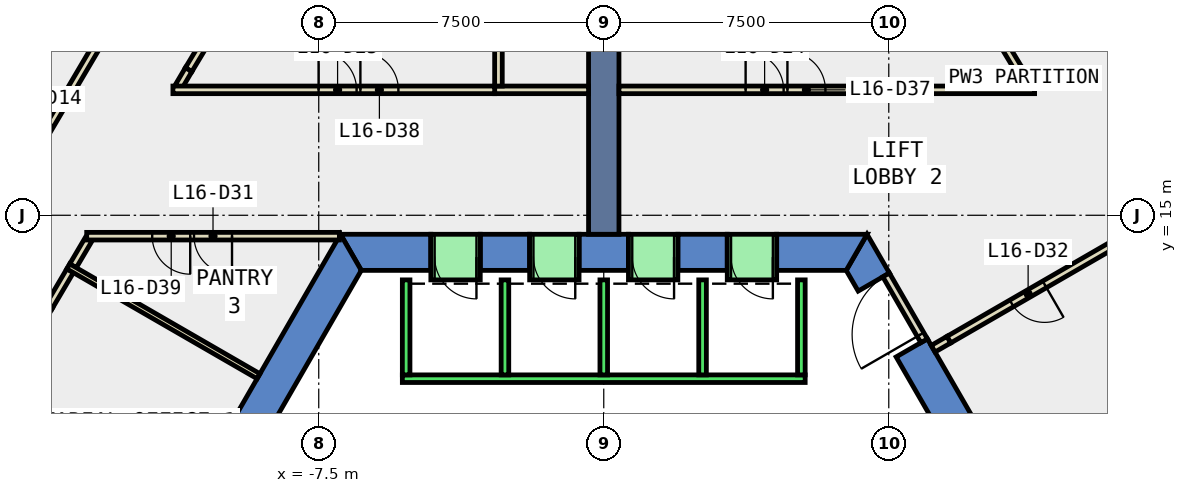
"""IFC4 building model, lengths in metres.
Left out: names, types, materials, properties, quantities, classifications, styles, units other than length and angle.
Written with IfcOpenShell. Run it as: python <this file> out.ifc"""

import sys

from ifc_helpers import new_model, si_unit, direction, frame, frame_2d, origin, place, context, subcontext, project, spatial, polyline, rectangle, outline, extrude, element, fill, save


model = new_model("IFC4")
c1 = context("Model", 3, precision=1e-05, world=origin(), true_north=direction((0.0, 1.0)))
c2 = subcontext(c1, "Body", "Model", "MODEL_VIEW")
j1 = project(units=[si_unit("LENGTHUNIT", "METRE"), si_unit("PLANEANGLEUNIT", "RADIAN")], contexts=[c1])
p1 = place(None, origin())
s1 = spatial("IfcSite", under=j1, at=p1, CompositionType="ELEMENT")
p2 = place(p1, origin())
s2 = spatial("IfcBuilding", under=s1, at=p2, CompositionType="ELEMENT")
p3 = place(p2, frame((0.0, 0.0, 77.0)))
s3 = spatial("IfcBuildingStorey", under=s2, at=p3, CompositionType="ELEMENT", Elevation=77.0)
p4 = place(p3, frame((0.0, 0.0, -0.4)))
e1 = element("IfcWall", 1, at=p4, inside=s3, PredefinedType="SHEAR", context=c2, shape_type="SweptSolid", body=[
    extrude(outline(polyline([(8.517, 11.748), (7.694, 11.273), (12.759, 2.5), (13.856, 2.5), (8.517, 11.748)])), origin(), (0.0, 0.0, 1.0), 4.0),
])
p5 = place(p3, frame((0.0, 0.0, -0.4)))
e2 = element("IfcWall", 2, at=p5, inside=s3, PredefinedType="SHEAR", context=c2, shape_type="SweptSolid", body=[
    extrude(outline(polyline([(6.695, 13.005), (7.517, 13.48), (6.928, 14.5), (6.38, 13.55), (6.695, 13.005)])), origin(), (0.0, 0.0, 1.0), 4.0),
])
p6 = place(p3, frame((0.0, 0.0, -0.4)))
e3 = element("IfcWall", 3, at=p6, inside=s3, PredefinedType="SHEAR", context=c2, shape_type="SweptSolid", body=[
    extrude(outline(polyline([(4.55, 14.5), (4.55, 13.55), (6.38, 13.55), (6.928, 14.5), (4.55, 14.5)])), origin(), (0.0, 0.0, 1.0), 4.0),
])
p7 = place(p3, frame((0.0, 0.0, -0.4)))
e4 = element("IfcWall", 4, at=p7, inside=s3, PredefinedType="SHEAR", context=c2, shape_type="SweptSolid", body=[
    extrude(outline(polyline([(1.95, 14.5), (1.95, 13.55), (3.25, 13.55), (3.25, 14.5), (1.95, 14.5)])), origin(), (0.0, 0.0, 1.0), 4.0),
])
p8 = place(p3, frame((0.0, 0.0, -0.4)))
e5 = element("IfcWall", 5, at=p8, inside=s3, PredefinedType="SHEAR", context=c2, shape_type="SweptSolid", body=[
    extrude(outline(polyline([(-0.65, 14.5), (-0.65, 13.55), (0.65, 13.55), (0.65, 14.5), (-0.65, 14.5)])), origin(), (0.0, 0.0, 1.0), 4.0),
])
p9 = place(p3, frame((0.0, 0.0, -0.4)))
e6 = element("IfcWall", 6, at=p9, inside=s3, PredefinedType="SHEAR", context=c2, shape_type="SweptSolid", body=[
    extrude(outline(polyline([(-3.25, 14.5), (-3.25, 13.55), (-1.95, 13.55), (-1.95, 14.5), (-3.25, 14.5)])), origin(), (0.0, 0.0, 1.0), 4.0),
])
p10 = place(p3, frame((0.0, 0.0, -0.4)))
e7 = element("IfcWall", 7, at=p10, inside=s3, PredefinedType="SHEAR", context=c2, shape_type="SweptSolid", body=[
    extrude(outline(polyline([(-4.55, 13.55), (-4.55, 14.5), (-6.928, 14.5), (-6.38, 13.55), (-4.55, 13.55)])), origin(), (0.0, 0.0, 1.0), 4.0),
])
p11 = place(p3, frame((0.0, 0.0, -0.4)))
e8 = element("IfcWall", 8, at=p11, inside=s3, PredefinedType="SHEAR", context=c2, shape_type="SweptSolid", body=[
    extrude(outline(polyline([(-12.267, 5.252), (-11.444, 4.777), (-6.38, 13.55), (-6.928, 14.5), (-12.267, 5.252)])), origin(), (0.0, 0.0, 1.0), 4.0),
])
p12 = place(p3, frame((0.0, 14.5, -0.4), z_axis=(0.0, 0.0, 1.0), x_axis=(0.0, 1.0, 0.0)))
e9 = element("IfcWall", 9, at=p12, inside=s3, PredefinedType="SHEAR", context=c2, shape_type="SweptSolid", body=[
    extrude(rectangle(XDim=9.0, YDim=0.8, at=frame_2d((4.5, 0.0))), origin(), (0.0, 0.0, 1.0), 4.0),
])
p13 = place(p3, frame((-14.042, 13.541, 0.0), z_axis=(0.0, 0.0, 1.0), x_axis=(-0.507733830316, -0.861513991501, 0.0)))
e10 = element("IfcWall", 10, at=p13, inside=s3, PredefinedType="PARTITIONING", context=c2, shape_type="SweptSolid", body=[
    extrude(rectangle(XDim=1.091, YDim=0.2, at=frame_2d((0.545, 0.0))), origin(), (0.0, 0.0, 1.0), 3.6),
])
p14 = place(p3, frame((-13.557, 14.364, 0.0), z_axis=(0.0, 0.0, 1.0), x_axis=(-0.507840899418, -0.861450881292, 0.0)))
e11 = element("IfcWall", 11, at=p14, inside=s3, PredefinedType="PARTITIONING", context=c2, shape_type="SweptSolid", body=[
    extrude(rectangle(XDim=0.806, YDim=0.2, at=frame_2d((0.403, 0.0))), origin(), (0.0, 0.0, 1.0), 3.6),
])
p15 = place(p3, frame((13.667, 14.375, 0.0), z_axis=(0.0, 0.0, 1.0), x_axis=(-0.866016748302, -0.500014991436, 0.0)))
e12 = element("IfcWall", 12, at=p15, inside=s3, PredefinedType="PARTITIONING", context=c2, shape_type="SweptSolid", body=[
    extrude(rectangle(XDim=5.298, YDim=0.2, at=frame_2d((2.649, 0.0))), origin(), (0.0, 0.0, 1.0), 3.6),
])
p16 = place(p15, frame((2.387, 0.0, 0.0)))
e13 = element("IfcOpeningElement", 13, at=p16, cuts=e12, PredefinedType="OPENING", context=c2, shape_type="SweptSolid", body=[
    extrude(rectangle(XDim=1.0, YDim=2.1, at=frame_2d((0.5, 1.05))), frame((0.0, 0.11, 0.0), z_axis=(0.0, -1.0, 0.0), x_axis=(1.0, 0.0, 0.0)), (0.0, 0.0, 1.0), 0.22),
])
p17 = place(p3, frame((11.186, 18.386, 0.0), z_axis=(0.0, 0.0, 1.0), x_axis=(-0.507247363226, 0.861800506208, 0.0)))
e14 = element("IfcWall", 14, at=p17, inside=s3, PredefinedType="PARTITIONING", context=c2, shape_type="SweptSolid", body=[
    extrude(rectangle(XDim=0.516, YDim=0.2, at=frame_2d((0.258, 0.0))), origin(), (0.0, 0.0, 1.0), 3.6),
])
p18 = place(p3, frame((10.924, 18.831, 0.0), z_axis=(0.0, 0.0, 1.0), x_axis=(-0.515797941416, 0.856710268195, 0.0)))
e15 = element("IfcWall", 15, at=p18, inside=s3, PredefinedType="PARTITIONING", context=c2, shape_type="SweptSolid", body=[
    extrude(rectangle(XDim=6.283, YDim=0.2, at=frame_2d((3.142, 0.0))), origin(), (0.0, 0.0, 1.0), 3.6),
])
p19 = place(p3, frame((-7.58, 24.386, 0.0), z_axis=(0.0, 0.0, 1.0), x_axis=(-0.51574664882, -0.85674114774, 0.0)))
e16 = element("IfcWall", 16, at=p19, inside=s3, PredefinedType="PARTITIONING", context=c2, shape_type="SweptSolid", body=[
    extrude(rectangle(XDim=6.484, YDim=0.2, at=frame_2d((3.242, 0.0))), origin(), (0.0, 0.0, 1.0), 3.6),
])
p20 = place(p3, frame((-10.924, 18.831, 0.0), z_axis=(0.0, 0.0, 1.0), x_axis=(-0.507247363226, -0.861800506208, 0.0)))
e17 = element("IfcWall", 17, at=p20, inside=s3, PredefinedType="PARTITIONING", context=c2, shape_type="SweptSolid", body=[
    extrude(rectangle(XDim=0.516, YDim=0.2, at=frame_2d((0.258, 0.0))), origin(), (0.0, 0.0, 1.0), 3.6),
])
p21 = place(p3, frame((12.986, 20.059, 0.0), z_axis=(0.0, 0.0, 1.0), x_axis=(0.507876424268, -0.861429937762, 0.0)))
e18 = element("IfcWall", 18, at=p21, inside=s3, PredefinedType="PARTITIONING", context=c2, shape_type="SweptSolid", body=[
    extrude(rectangle(XDim=3.55, YDim=0.2, at=frame_2d((1.775, 0.0))), origin(), (0.0, 0.0, 1.0), 3.6),
])
p22 = place(p21, frame((1.275, 0.0, 0.0)))
e19 = element("IfcOpeningElement", 19, at=p22, cuts=e18, PredefinedType="OPENING", context=c2, shape_type="SweptSolid", body=[
    extrude(rectangle(XDim=1.0, YDim=2.1, at=frame_2d((0.5, 1.05))), frame((0.0, 0.11, 0.0), z_axis=(0.0, -1.0, 0.0), x_axis=(1.0, 0.0, 0.0)), (0.0, 0.0, 1.0), 0.22),
])
p23 = place(p3, frame((-16.669, 13.811, 0.0), z_axis=(0.0, 0.0, 1.0), x_axis=(0.507777955495, 0.861487984776, 0.0)))
e20 = element("IfcWall", 20, at=p23, inside=s3, PredefinedType="PARTITIONING", context=c2, shape_type="SweptSolid", body=[
    extrude(rectangle(XDim=7.178, YDim=0.2, at=frame_2d((3.589, 0.0))), origin(), (0.0, 0.0, 1.0), 3.6),
])
p24 = place(p23, frame((3.164, 0.0, 0.0)))
e21 = element("IfcOpeningElement", 21, at=p24, cuts=e20, PredefinedType="OPENING", context=c2, shape_type="SweptSolid", body=[
    extrude(rectangle(XDim=1.0, YDim=2.1, at=frame_2d((0.5, 1.05))), frame((0.0, 0.11, 0.0), z_axis=(0.0, -1.0, 0.0), x_axis=(1.0, 0.0, 0.0)), (0.0, 0.0, 1.0), 0.22),
])
p25 = place(p3, frame((-14.091, 13.655, 0.0), z_axis=(0.0, 0.0, 1.0), x_axis=(0.866035778077, -0.499982030767, 0.0)))
e22 = element("IfcWall", 22, at=p25, inside=s3, PredefinedType="PARTITIONING", context=c2, shape_type="SweptSolid", body=[
    extrude(rectangle(XDim=5.781, YDim=0.15, at=frame_2d((2.89, 0.0))), origin(), (0.0, 0.0, 1.0), 3.6),
])
p26 = place(p3, frame((-6.957, 14.45, 0.0), z_axis=(0.0, 0.0, 1.0), x_axis=(-1.0, 0.0, 0.0)))
e23 = element("IfcWall", 23, at=p26, inside=s3, PredefinedType="PARTITIONING", context=c2, shape_type="SweptSolid", body=[
    extrude(rectangle(XDim=6.649, YDim=0.2, at=frame_2d((3.324, 0.0))), origin(), (0.0, 0.0, 1.0), 3.6),
])
p27 = place(p26, frame((2.825, 0.0, 0.0)))
e24 = element("IfcOpeningElement", 24, at=p27, cuts=e23, PredefinedType="OPENING", context=c2, shape_type="SweptSolid", body=[
    extrude(rectangle(XDim=1.0, YDim=2.1, at=frame_2d((0.5, 1.05))), frame((0.0, 0.11, 0.0), z_axis=(0.0, -1.0, 0.0), x_axis=(1.0, 0.0, 0.0)), (0.0, 0.0, 1.0), 0.22),
])
p28 = place(p26, frame((3.925, 0.0, 0.0)))
e25 = element("IfcOpeningElement", 25, at=p28, cuts=e23, PredefinedType="OPENING", context=c2, shape_type="SweptSolid", body=[
    extrude(rectangle(XDim=1.0, YDim=2.1, at=frame_2d((0.5, 1.05))), frame((0.0, 0.11, 0.0), z_axis=(0.0, -1.0, 0.0), x_axis=(1.0, 0.0, 0.0)), (0.0, 0.0, 1.0), 0.22),
])
p29 = place(p3, frame((-2.871, 18.3, 0.0), z_axis=(0.0, 0.0, 1.0), x_axis=(1.0, 0.0, 0.0)))
e26 = element("IfcWall", 26, at=p29, inside=s3, PredefinedType="PARTITIONING", context=c2, shape_type="SweptSolid", body=[
    extrude(rectangle(XDim=2.471, YDim=0.2, at=frame_2d((1.236, 0.0))), origin(), (0.0, 0.0, 1.0), 3.6),
])
p30 = place(p3, frame((-11.337, 18.3, 0.0), z_axis=(0.0, 0.0, 1.0), x_axis=(1.0, 0.0, 0.0)))
e27 = element("IfcWall", 27, at=p30, inside=s3, PredefinedType="PARTITIONING", context=c2, shape_type="SweptSolid", body=[
    extrude(rectangle(XDim=8.466, YDim=0.2, at=frame_2d((4.233, 0.0))), origin(), (0.0, 0.0, 1.0), 3.6),
])
p31 = place(p30, frame((3.833, 0.0, 0.0)))
e28 = element("IfcOpeningElement", 28, at=p31, cuts=e27, PredefinedType="OPENING", context=c2, shape_type="SweptSolid", body=[
    extrude(rectangle(XDim=1.0, YDim=2.1, at=frame_2d((0.5, 1.05))), frame((0.0, 0.11, 0.0), z_axis=(0.0, -1.0, 0.0), x_axis=(1.0, 0.0, 0.0)), (0.0, 0.0, 1.0), 0.22),
])
p32 = place(p30, frame((4.933, 0.0, 0.0)))
e29 = element("IfcOpeningElement", 29, at=p32, cuts=e27, PredefinedType="OPENING", context=c2, shape_type="SweptSolid", body=[
    extrude(rectangle(XDim=1.0, YDim=2.1, at=frame_2d((0.5, 1.05))), frame((0.0, 0.11, 0.0), z_axis=(0.0, -1.0, 0.0), x_axis=(1.0, 0.0, 0.0)), (0.0, 0.0, 1.0), 0.22),
])
p33 = place(p3, frame((-2.771, 18.4, 0.0), z_axis=(0.0, 0.0, 1.0), x_axis=(0.0, 1.0, 0.0)))
e30 = element("IfcWall", 30, at=p33, inside=s3, PredefinedType="PARTITIONING", context=c2, shape_type="SweptSolid", body=[
    extrude(rectangle(XDim=6.0, YDim=0.2, at=frame_2d((3.0, 0.0))), origin(), (0.0, 0.0, 1.0), 3.6),
])
p34 = place(p3, frame((8.43, 11.698, 0.0), z_axis=(0.0, 0.0, 1.0), x_axis=(-0.50002537861, 0.866010750942, 0.0)))
e31 = element("IfcWall", 31, at=p34, inside=s3, PredefinedType="PARTITIONING", context=c2, shape_type="SweptSolid", body=[
    extrude(rectangle(XDim=2.0, YDim=0.2, at=frame_2d((1.0, 0.0))), origin(), (0.0, 0.0, 1.0), 2.4),
])
p35 = place(p34, frame((0.19, 0.0, 0.0)))
e32 = element("IfcOpeningElement", 32, at=p35, cuts=e31, PredefinedType="OPENING", context=c2, shape_type="SweptSolid", body=[
    extrude(rectangle(XDim=1.8, YDim=2.1, at=frame_2d((0.9, 1.05))), frame((0.0, 0.11, 0.0), z_axis=(0.0, -1.0, 0.0), x_axis=(1.0, 0.0, 0.0)), (0.0, 0.0, 1.0), 0.22),
])
p36 = place(p3, frame((0.4, 18.3, 0.0), z_axis=(0.0, 0.0, 1.0), x_axis=(1.0, 0.0, 0.0)))
e33 = element("IfcWall", 33, at=p36, inside=s3, PredefinedType="PARTITIONING", context=c2, shape_type="SweptSolid", body=[
    extrude(rectangle(XDim=10.937, YDim=0.2, at=frame_2d((5.469, 0.0))), origin(), (0.0, 0.0, 1.0), 3.6),
])
p37 = place(p36, frame((3.333, 0.0, 0.0)))
e34 = element("IfcOpeningElement", 34, at=p37, cuts=e33, PredefinedType="OPENING", context=c2, shape_type="SweptSolid", body=[
    extrude(rectangle(XDim=1.0, YDim=2.1, at=frame_2d((0.5, 1.05))), frame((0.0, 0.11, 0.0), z_axis=(0.0, -1.0, 0.0), x_axis=(1.0, 0.0, 0.0)), (0.0, 0.0, 1.0), 0.22),
])
p38 = place(p36, frame((4.433, 0.0, 0.0)))
e35 = element("IfcOpeningElement", 35, at=p38, cuts=e33, PredefinedType="OPENING", context=c2, shape_type="SweptSolid", body=[
    extrude(rectangle(XDim=1.0, YDim=2.1, at=frame_2d((0.5, 1.05))), frame((0.0, 0.11, 0.0), z_axis=(0.0, -1.0, 0.0), x_axis=(1.0, 0.0, 0.0)), (0.0, 0.0, 1.0), 0.22),
])
p39 = place(p3, frame((9.079, 11.726, 0.0), z_axis=(0.0, 0.0, 1.0), x_axis=(-0.865929261247, -0.500166486798, 0.0)))
e36 = element("IfcWall", 36, at=p39, inside=s3, PredefinedType="PARTITIONING", context=c2, shape_type="SweptSolid", body=[
    extrude(rectangle(XDim=0.476, YDim=0.2, at=frame_2d((0.238, 0.0))), origin(), (0.0, 0.0, 1.0), 2.4),
])
p40 = place(p3, frame((5.3, 10.7, 0.0), z_axis=(0.0, 0.0, 1.0), x_axis=(-1.0, 0.0, 0.0)))
e37 = element("IfcWall", 37, at=p40, inside=s3, PredefinedType="STANDARD", context=c2, shape_type="SweptSolid", body=[
    extrude(rectangle(XDim=10.6, YDim=0.2, at=frame_2d((5.3, 0.0))), origin(), (0.0, 0.0, 1.0), 3.6),
])
for number, where, z_axis, x_axis in (
    (38, (5.2, 10.8, 0.0), (0.0, 0.0, 1.0), (0.0, 1.0, 0.0)),
    (39, (2.6, 10.8, 0.0), (0.0, 0.0, 1.0), (0.0, 1.0, 0.0)),
    (40, (0.0, 10.8, 0.0), (0.0, 0.0, 1.0), (0.0, 1.0, 0.0)),
    (41, (-2.6, 10.8, 0.0), (0.0, 0.0, 1.0), (0.0, 1.0, 0.0)),
    (42, (-5.2, 10.8, 0.0), (0.0, 0.0, 1.0), (0.0, 1.0, 0.0)),
):
    element("IfcWall", number, at=place(p3, frame(where, z_axis=z_axis, x_axis=x_axis)), inside=s3, PredefinedType="STANDARD", context=c2, shape_type="SweptSolid", body=[
        extrude(rectangle(XDim=2.5, YDim=0.2, at=frame_2d((1.25, 0.0))), origin(), (0.0, 0.0, 1.0), 3.6),
    ])
p41 = place(p3, frame((4.55, 13.9, 0.0), z_axis=(0.0, 0.0, 1.0), x_axis=(-1.0, 0.0, 0.0)))
e43 = element("IfcWall", 43, at=p41, inside=s3, PredefinedType="STANDARD", context=c2, shape_type="SweptSolid", body=[
    extrude(rectangle(XDim=1.3, YDim=1.2, at=frame_2d((0.65, 0.0))), origin(), (0.0, 0.0, 1.0), 2.4),
])
p42 = place(p41, frame((0.1, 0.0, 0.0)))
e44 = element("IfcOpeningElement", 44, at=p42, cuts=e43, PredefinedType="OPENING", context=c2, shape_type="SweptSolid", body=[
    extrude(rectangle(XDim=1.1, YDim=2.3, at=frame_2d((0.55, 1.15))), frame((0.0, 0.61, 0.0), z_axis=(0.0, -1.0, 0.0), x_axis=(1.0, 0.0, 0.0)), (0.0, 0.0, 1.0), 1.22),
])
p43 = place(p3, frame((1.95, 13.9, 0.0), z_axis=(0.0, 0.0, 1.0), x_axis=(-1.0, 0.0, 0.0)))
e45 = element("IfcWall", 45, at=p43, inside=s3, PredefinedType="STANDARD", context=c2, shape_type="SweptSolid", body=[
    extrude(rectangle(XDim=1.3, YDim=1.2, at=frame_2d((0.65, 0.0))), origin(), (0.0, 0.0, 1.0), 2.4),
])
p44 = place(p43, frame((0.1, 0.0, 0.0)))
e46 = element("IfcOpeningElement", 46, at=p44, cuts=e45, PredefinedType="OPENING", context=c2, shape_type="SweptSolid", body=[
    extrude(rectangle(XDim=1.1, YDim=2.3, at=frame_2d((0.55, 1.15))), frame((0.0, 0.61, 0.0), z_axis=(0.0, -1.0, 0.0), x_axis=(1.0, 0.0, 0.0)), (0.0, 0.0, 1.0), 1.22),
])
p45 = place(p3, frame((-0.65, 13.9, 0.0), z_axis=(0.0, 0.0, 1.0), x_axis=(-1.0, 0.0, 0.0)))
e47 = element("IfcWall", 47, at=p45, inside=s3, PredefinedType="STANDARD", context=c2, shape_type="SweptSolid", body=[
    extrude(rectangle(XDim=1.3, YDim=1.2, at=frame_2d((0.65, 0.0))), origin(), (0.0, 0.0, 1.0), 2.4),
])
p46 = place(p45, frame((0.1, 0.0, 0.0)))
e48 = element("IfcOpeningElement", 48, at=p46, cuts=e47, PredefinedType="OPENING", context=c2, shape_type="SweptSolid", body=[
    extrude(rectangle(XDim=1.1, YDim=2.3, at=frame_2d((0.55, 1.15))), frame((0.0, 0.61, 0.0), z_axis=(0.0, -1.0, 0.0), x_axis=(1.0, 0.0, 0.0)), (0.0, 0.0, 1.0), 1.22),
])
p47 = place(p3, frame((-3.25, 13.9, 0.0), z_axis=(0.0, 0.0, 1.0), x_axis=(-1.0, 0.0, 0.0)))
e49 = element("IfcWall", 49, at=p47, inside=s3, PredefinedType="STANDARD", context=c2, shape_type="SweptSolid", body=[
    extrude(rectangle(XDim=1.3, YDim=1.2, at=frame_2d((0.65, 0.0))), origin(), (0.0, 0.0, 1.0), 2.4),
])
p48 = place(p47, frame((0.1, 0.0, 0.0)))
e50 = element("IfcOpeningElement", 50, at=p48, cuts=e49, PredefinedType="OPENING", context=c2, shape_type="SweptSolid", body=[
    extrude(rectangle(XDim=1.1, YDim=2.3, at=frame_2d((0.55, 1.15))), frame((0.0, 0.61, 0.0), z_axis=(0.0, -1.0, 0.0), x_axis=(1.0, 0.0, 0.0)), (0.0, 0.0, 1.0), 1.22),
])
p49 = place(p37, origin())
e51 = element("IfcDoor", 51, at=p49, inside=s3, OperationType="SINGLE_SWING_LEFT", PredefinedType="DOOR", context=c2, shape_type="SweptSolid", body=[
    extrude(rectangle(XDim=1.0, YDim=2.1, at=frame_2d((0.5, 1.05))), frame((0.0, 0.025, 0.0), z_axis=(0.0, -1.0, 0.0), x_axis=(1.0, 0.0, 0.0)), (0.0, 0.0, 1.0), 0.05),
])
fill(e34, e51)
p50 = place(p31, origin())
e52 = element("IfcDoor", 52, at=p50, inside=s3, OperationType="SINGLE_SWING_RIGHT", PredefinedType="DOOR", context=c2, shape_type="SweptSolid", body=[
    extrude(rectangle(XDim=1.0, YDim=2.1, at=frame_2d((0.5, 1.05))), frame((0.0, 0.025, 0.0), z_axis=(0.0, -1.0, 0.0), x_axis=(1.0, 0.0, 0.0)), (0.0, 0.0, 1.0), 0.05),
])
fill(e28, e52)
p51 = place(p27, origin())
e53 = element("IfcDoor", 53, at=p51, inside=s3, OperationType="SINGLE_SWING_LEFT", PredefinedType="DOOR", context=c2, shape_type="SweptSolid", body=[
    extrude(rectangle(XDim=1.0, YDim=2.1, at=frame_2d((0.5, 1.05))), frame((0.0, 0.025, 0.0), z_axis=(0.0, -1.0, 0.0), x_axis=(1.0, 0.0, 0.0)), (0.0, 0.0, 1.0), 0.05),
])
fill(e24, e53)
p52 = place(p16, origin())
e54 = element("IfcDoor", 54, at=p52, inside=s3, OperationType="SINGLE_SWING_LEFT", PredefinedType="DOOR", context=c2, shape_type="SweptSolid", body=[
    extrude(rectangle(XDim=1.0, YDim=2.1, at=frame_2d((0.5, 1.05))), frame((0.0, 0.025, 0.0), z_axis=(0.0, -1.0, 0.0), x_axis=(1.0, 0.0, 0.0)), (0.0, 0.0, 1.0), 0.05),
])
fill(e13, e54)
p53 = place(p38, origin())
e55 = element("IfcDoor", 55, at=p53, inside=s3, OperationType="SINGLE_SWING_RIGHT", PredefinedType="DOOR", context=c2, shape_type="SweptSolid", body=[
    extrude(rectangle(XDim=1.0, YDim=2.1, at=frame_2d((0.5, 1.05))), frame((0.0, 0.025, 0.0), z_axis=(0.0, -1.0, 0.0), x_axis=(1.0, 0.0, 0.0)), (0.0, 0.0, 1.0), 0.05),
])
fill(e35, e55)
p54 = place(p32, origin())
e56 = element("IfcDoor", 56, at=p54, inside=s3, OperationType="SINGLE_SWING_RIGHT", PredefinedType="DOOR", context=c2, shape_type="SweptSolid", body=[
    extrude(rectangle(XDim=1.0, YDim=2.1, at=frame_2d((0.5, 1.05))), frame((0.0, 0.025, 0.0), z_axis=(0.0, -1.0, 0.0), x_axis=(1.0, 0.0, 0.0)), (0.0, 0.0, 1.0), 0.05),
])
fill(e29, e56)
p55 = place(p28, origin())
e57 = element("IfcDoor", 57, at=p55, inside=s3, OperationType="SINGLE_SWING_RIGHT", PredefinedType="DOOR", context=c2, shape_type="SweptSolid", body=[
    extrude(rectangle(XDim=1.0, YDim=2.1, at=frame_2d((0.5, 1.05))), frame((0.0, 0.025, 0.0), z_axis=(0.0, -1.0, 0.0), x_axis=(1.0, 0.0, 0.0)), (0.0, 0.0, 1.0), 0.05),
])
fill(e25, e57)
p56 = place(p35, origin())
e58 = element("IfcDoor", 58, at=p56, inside=s3, OperationType="DOUBLE_DOOR_SINGLE_SWING", PredefinedType="DOOR", context=c2, shape_type="SweptSolid", body=[
    extrude(rectangle(XDim=1.8, YDim=2.1, at=frame_2d((0.9, 1.05))), frame((0.0, 0.025, 0.0), z_axis=(0.0, -1.0, 0.0), x_axis=(1.0, 0.0, 0.0)), (0.0, 0.0, 1.0), 0.05),
])
fill(e32, e58)
p57 = place(p42, origin())
e59 = element("IfcDoor", 59, at=p57, inside=s3, OperationType="SLIDING_TO_LEFT", PredefinedType="DOOR", context=c2, shape_type="SweptSolid", body=[
    extrude(rectangle(XDim=1.1, YDim=2.3, at=frame_2d((0.55, 1.15))), frame((0.0, 0.025, 0.0), z_axis=(0.0, -1.0, 0.0), x_axis=(1.0, 0.0, 0.0)), (0.0, 0.0, 1.0), 0.05),
])
fill(e44, e59)
p58 = place(p44, origin())
e60 = element("IfcDoor", 60, at=p58, inside=s3, OperationType="SLIDING_TO_LEFT", PredefinedType="DOOR", context=c2, shape_type="SweptSolid", body=[
    extrude(rectangle(XDim=1.1, YDim=2.3, at=frame_2d((0.55, 1.15))), frame((0.0, 0.025, 0.0), z_axis=(0.0, -1.0, 0.0), x_axis=(1.0, 0.0, 0.0)), (0.0, 0.0, 1.0), 0.05),
])
fill(e46, e60)
p59 = place(p46, origin())
e61 = element("IfcDoor", 61, at=p59, inside=s3, OperationType="SLIDING_TO_LEFT", PredefinedType="DOOR", context=c2, shape_type="SweptSolid", body=[
    extrude(rectangle(XDim=1.1, YDim=2.3, at=frame_2d((0.55, 1.15))), frame((0.0, 0.025, 0.0), z_axis=(0.0, -1.0, 0.0), x_axis=(1.0, 0.0, 0.0)), (0.0, 0.0, 1.0), 0.05),
])
fill(e48, e61)
p60 = place(p48, origin())
e62 = element("IfcDoor", 62, at=p60, inside=s3, OperationType="SLIDING_TO_LEFT", PredefinedType="DOOR", context=c2, shape_type="SweptSolid", body=[
    extrude(rectangle(XDim=1.1, YDim=2.3, at=frame_2d((0.55, 1.15))), frame((0.0, 0.025, 0.0), z_axis=(0.0, -1.0, 0.0), x_axis=(1.0, 0.0, 0.0)), (0.0, 0.0, 1.0), 0.05),
])
fill(e50, e62)
save(model, sys.argv[1])
